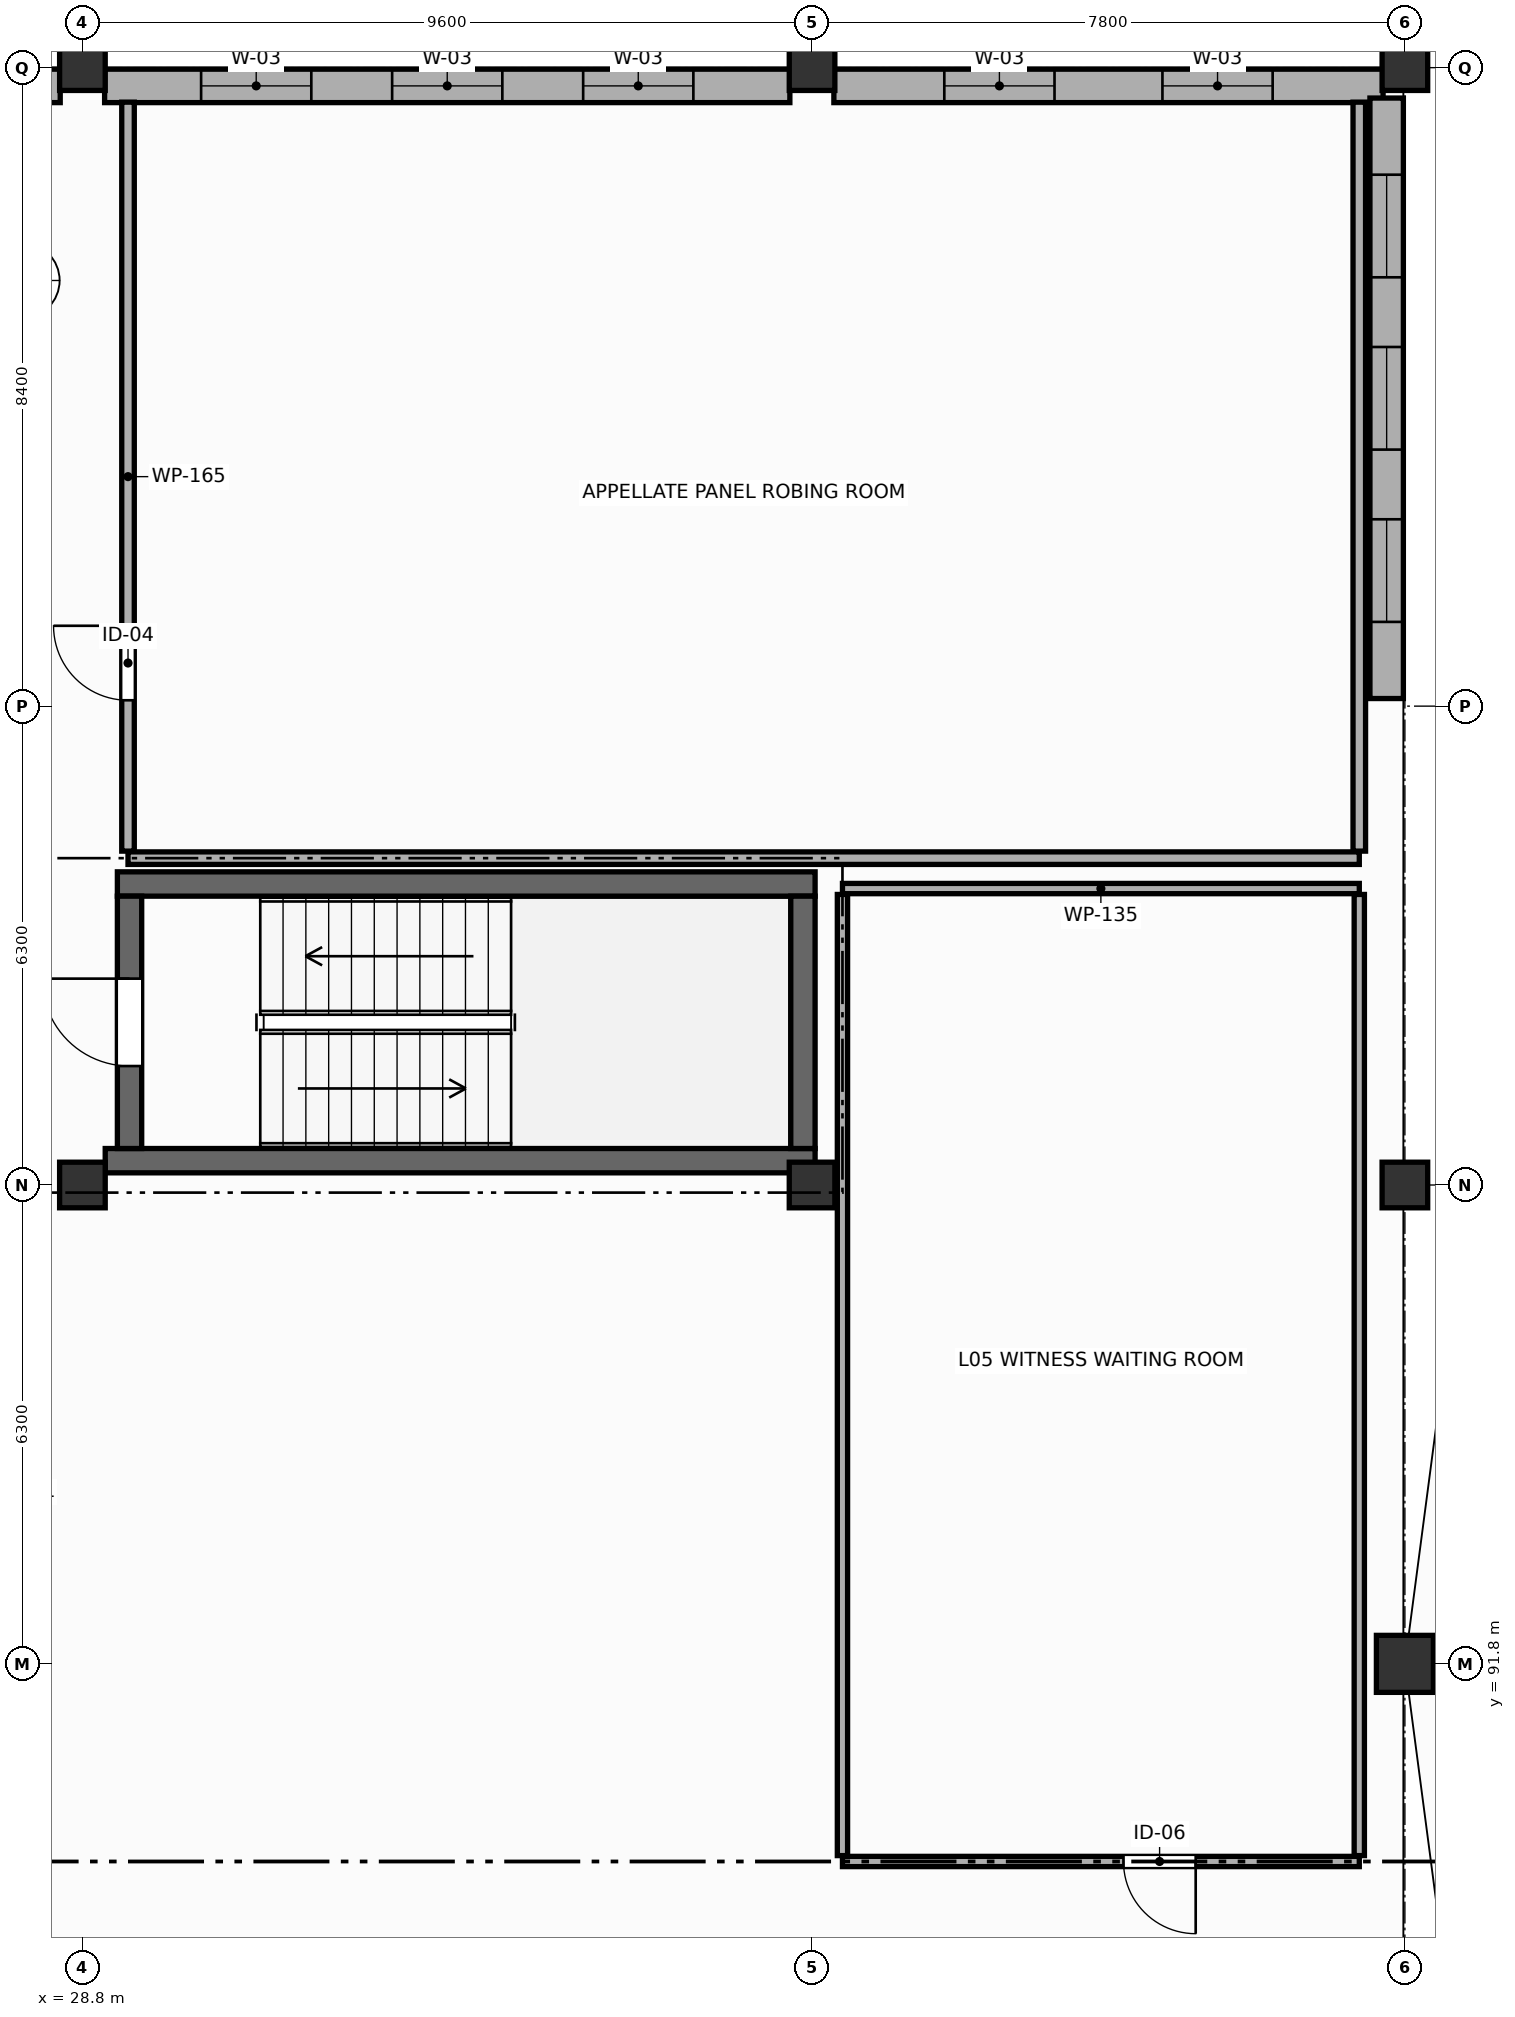
"""IFC4 building model, lengths in metres.
Left out: names, types, materials, properties, quantities, classifications, styles, units other than length and angle.
Written with IfcOpenShell. Run it as: python <this file> out.ifc"""

import sys

from ifc_helpers import new_model, si_unit, direction, frame, frame_2d, origin, origin_2d, place, context, subcontext, project, spatial, rectangle, circle, extrude, element, fill, save


model = new_model("IFC4")
c1 = context("Model", 3, precision=1e-05, world=origin(), true_north=direction((0.0, 1.0)))
c2 = subcontext(c1, "Body", "Model", "MODEL_VIEW")
j1 = project(units=[si_unit("LENGTHUNIT", "METRE"), si_unit("PLANEANGLEUNIT", "RADIAN")], contexts=[c1])
p1 = place(None, origin())
s1 = spatial("IfcSite", under=j1, at=p1, CompositionType="ELEMENT")
p2 = place(p1, origin())
s2 = spatial("IfcBuilding", under=s1, at=p2, CompositionType="ELEMENT")
p3 = place(p2, frame((0.0, 0.0, 18.6)))
s3 = spatial("IfcBuildingStorey", under=s2, at=p3, CompositionType="ELEMENT", Elevation=18.6)
p4 = place(p3, frame((46.2, 91.8, 0.0), z_axis=(0.0, 0.0, 1.0), x_axis=(1.0, 0.0, 0.0)))
e1 = element("IfcColumn", 1, at=p4, inside=s3, PredefinedType="COLUMN", context=c2, shape_type="SweptSolid", body=[
    extrude(circle(Radius=0.375, at=origin_2d()), origin(), (0.0, 0.0, 1.0), 4.2),
])
for number, where, z_axis, x_axis in (
    (2, (28.8, 98.1, 0.0), (0.0, 0.0, 1.0), (1.0, 0.0, 0.0)),
    (3, (28.8, 112.8, 0.0), (0.0, 0.0, 1.0), (1.0, 0.0, 0.0)),
    (4, (38.4, 98.1, 0.0), (0.0, 0.0, 1.0), (1.0, 0.0, 0.0)),
    (5, (38.4, 112.8, 0.0), (0.0, 0.0, 1.0), (1.0, 0.0, 0.0)),
    (6, (46.2, 98.1, 0.0), (0.0, 0.0, 1.0), (1.0, 0.0, 0.0)),
    (7, (46.2, 112.8, 0.0), (0.0, 0.0, 1.0), (1.0, 0.0, 0.0)),
):
    element("IfcColumn", number, at=place(p3, frame(where, z_axis=z_axis, x_axis=x_axis)), inside=s3, PredefinedType="COLUMN", context=c2, shape_type="SweptSolid", body=[
        extrude(rectangle(XDim=0.6, YDim=0.6, at=origin_2d()), origin(), (0.0, 0.0, 1.0), 4.2),
    ])
p5 = place(p3, frame((19.492, 112.56, 0.0), z_axis=(0.0, 0.0, 1.0), x_axis=(1.0, 0.0, 0.0)))
e8 = element("IfcWall", 8, at=p5, inside=s3, PredefinedType="STANDARD", context=c2, shape_type="SweptSolid", body=[
    extrude(rectangle(XDim=9.016, YDim=0.44, at=frame_2d((4.508, 0.0))), origin(), (0.0, 0.0, 1.0), 3.04),
])
p6 = place(p5, frame((1.27, 0.0, 0.77)))
e9 = element("IfcOpeningElement", 9, at=p6, cuts=e8, PredefinedType="OPENING", context=c2, shape_type="SweptSolid", body=[
    extrude(rectangle(XDim=1.45, YDim=2.05, at=frame_2d((0.725, 1.025))), frame((0.0, 0.23, 0.0), z_axis=(0.0, -1.0, 0.0), x_axis=(1.0, 0.0, 0.0)), (0.0, 0.0, 1.0), 0.46),
])
p7 = place(p5, frame((3.783, 0.0, 0.77)))
e10 = element("IfcOpeningElement", 10, at=p7, cuts=e8, PredefinedType="OPENING", context=c2, shape_type="SweptSolid", body=[
    extrude(rectangle(XDim=1.45, YDim=2.05, at=frame_2d((0.725, 1.025))), frame((0.0, 0.23, 0.0), z_axis=(0.0, -1.0, 0.0), x_axis=(1.0, 0.0, 0.0)), (0.0, 0.0, 1.0), 0.46),
])
p8 = place(p5, frame((6.296, 0.0, 0.77)))
e11 = element("IfcOpeningElement", 11, at=p8, cuts=e8, PredefinedType="OPENING", context=c2, shape_type="SweptSolid", body=[
    extrude(rectangle(XDim=1.45, YDim=2.05, at=frame_2d((0.725, 1.025))), frame((0.0, 0.23, 0.0), z_axis=(0.0, -1.0, 0.0), x_axis=(1.0, 0.0, 0.0)), (0.0, 0.0, 1.0), 0.46),
])
p9 = place(p3, frame((29.092, 112.56, 0.0), z_axis=(0.0, 0.0, 1.0), x_axis=(1.0, 0.0, 0.0)))
e12 = element("IfcWall", 12, at=p9, inside=s3, PredefinedType="STANDARD", context=c2, shape_type="SweptSolid", body=[
    extrude(rectangle(XDim=9.016, YDim=0.44, at=frame_2d((4.508, 0.0))), origin(), (0.0, 0.0, 1.0), 3.04),
])
p10 = place(p9, frame((1.27, 0.0, 0.77)))
e13 = element("IfcOpeningElement", 13, at=p10, cuts=e12, PredefinedType="OPENING", context=c2, shape_type="SweptSolid", body=[
    extrude(rectangle(XDim=1.45, YDim=2.05, at=frame_2d((0.725, 1.025))), frame((0.0, 0.23, 0.0), z_axis=(0.0, -1.0, 0.0), x_axis=(1.0, 0.0, 0.0)), (0.0, 0.0, 1.0), 0.46),
])
p11 = place(p9, frame((3.783, 0.0, 0.77)))
e14 = element("IfcOpeningElement", 14, at=p11, cuts=e12, PredefinedType="OPENING", context=c2, shape_type="SweptSolid", body=[
    extrude(rectangle(XDim=1.45, YDim=2.05, at=frame_2d((0.725, 1.025))), frame((0.0, 0.23, 0.0), z_axis=(0.0, -1.0, 0.0), x_axis=(1.0, 0.0, 0.0)), (0.0, 0.0, 1.0), 0.46),
])
p12 = place(p9, frame((6.296, 0.0, 0.77)))
e15 = element("IfcOpeningElement", 15, at=p12, cuts=e12, PredefinedType="OPENING", context=c2, shape_type="SweptSolid", body=[
    extrude(rectangle(XDim=1.45, YDim=2.05, at=frame_2d((0.725, 1.025))), frame((0.0, 0.23, 0.0), z_axis=(0.0, -1.0, 0.0), x_axis=(1.0, 0.0, 0.0)), (0.0, 0.0, 1.0), 0.46),
])
p13 = place(p3, frame((38.687, 112.56, 0.0), z_axis=(0.0, 0.0, 1.0), x_axis=(1.0, 0.0, 0.0)))
e16 = element("IfcWall", 16, at=p13, inside=s3, PredefinedType="STANDARD", context=c2, shape_type="SweptSolid", body=[
    extrude(rectangle(XDim=7.226, YDim=0.44, at=frame_2d((3.613, 0.0))), origin(), (0.0, 0.0, 1.0), 3.04),
])
p14 = place(p13, frame((1.453, 0.0, 0.77)))
e17 = element("IfcOpeningElement", 17, at=p14, cuts=e16, PredefinedType="OPENING", context=c2, shape_type="SweptSolid", body=[
    extrude(rectangle(XDim=1.45, YDim=2.05, at=frame_2d((0.725, 1.025))), frame((0.0, 0.23, 0.0), z_axis=(0.0, -1.0, 0.0), x_axis=(1.0, 0.0, 0.0)), (0.0, 0.0, 1.0), 0.46),
])
p15 = place(p13, frame((4.323, 0.0, 0.77)))
e18 = element("IfcOpeningElement", 18, at=p15, cuts=e16, PredefinedType="OPENING", context=c2, shape_type="SweptSolid", body=[
    extrude(rectangle(XDim=1.45, YDim=2.05, at=frame_2d((0.725, 1.025))), frame((0.0, 0.23, 0.0), z_axis=(0.0, -1.0, 0.0), x_axis=(1.0, 0.0, 0.0)), (0.0, 0.0, 1.0), 0.46),
])
p16 = place(p3, frame((45.96, 104.5, 0.0), z_axis=(0.0, 0.0, 1.0), x_axis=(0.0, 1.0, 0.0)))
e19 = element("IfcWall", 19, at=p16, inside=s3, PredefinedType="STANDARD", context=c2, shape_type="SweptSolid", body=[
    extrude(rectangle(XDim=7.9, YDim=0.44, at=frame_2d((3.95, 0.0))), origin(), (0.0, 0.0, 1.0), 3.04),
])
p17 = place(p16, frame((1.008, 0.0, 0.85)))
e20 = element("IfcOpeningElement", 20, at=p17, cuts=e19, PredefinedType="OPENING", context=c2, shape_type="SweptSolid", body=[
    extrude(rectangle(XDim=1.35, YDim=1.95, at=frame_2d((0.675, 0.975))), frame((0.0, 0.23, 0.0), z_axis=(0.0, -1.0, 0.0), x_axis=(1.0, 0.0, 0.0)), (0.0, 0.0, 1.0), 0.46),
])
p18 = place(p16, frame((3.275, 0.0, 0.85)))
e21 = element("IfcOpeningElement", 21, at=p18, cuts=e19, PredefinedType="OPENING", context=c2, shape_type="SweptSolid", body=[
    extrude(rectangle(XDim=1.35, YDim=1.95, at=frame_2d((0.675, 0.975))), frame((0.0, 0.23, 0.0), z_axis=(0.0, -1.0, 0.0), x_axis=(1.0, 0.0, 0.0)), (0.0, 0.0, 1.0), 0.46),
])
p19 = place(p16, frame((5.542, 0.0, 0.85)))
e22 = element("IfcOpeningElement", 22, at=p19, cuts=e19, PredefinedType="OPENING", context=c2, shape_type="SweptSolid", body=[
    extrude(rectangle(XDim=1.35, YDim=1.95, at=frame_2d((0.675, 0.975))), frame((0.0, 0.23, 0.0), z_axis=(0.0, -1.0, 0.0), x_axis=(1.0, 0.0, 0.0)), (0.0, 0.0, 1.0), 0.46),
])
p20 = place(p3, frame((29.26, 102.06, 0.0), z_axis=(0.0, 0.0, 1.0), x_axis=(1.0, 0.0, 0.0)))
e23 = element("IfcWall", 23, at=p20, inside=s3, PredefinedType="SHEAR", context=c2, shape_type="SweptSolid", body=[
    extrude(rectangle(XDim=9.18, YDim=0.32, at=frame_2d((4.59, 0.0))), origin(), (0.0, 0.0, 1.0), 3.96),
])
p21 = place(p3, frame((38.44, 98.42, 0.0), z_axis=(0.0, 0.0, 1.0), x_axis=(-1.0, 0.0, 0.0)))
e24 = element("IfcWall", 24, at=p21, inside=s3, PredefinedType="SHEAR", context=c2, shape_type="SweptSolid", body=[
    extrude(rectangle(XDim=9.34, YDim=0.32, at=frame_2d((4.67, 0.0))), origin(), (0.0, 0.0, 1.0), 3.96),
])
p22 = place(p3, frame((29.42, 98.58, 0.0), z_axis=(0.0, 0.0, 1.0), x_axis=(0.0, 1.0, 0.0)))
e25 = element("IfcWall", 25, at=p22, inside=s3, PredefinedType="SHEAR", context=c2, shape_type="SweptSolid", body=[
    extrude(rectangle(XDim=3.32, YDim=0.32, at=frame_2d((1.66, 0.0))), origin(), (0.0, 0.0, 1.0), 3.96),
])
p23 = place(p22, frame((1.085, 0.0, 0.0)))
e26 = element("IfcOpeningElement", 26, at=p23, cuts=e25, PredefinedType="OPENING", context=c2, shape_type="SweptSolid", body=[
    extrude(rectangle(XDim=1.15, YDim=2.2, at=frame_2d((0.575, 1.1))), frame((0.0, 0.17, 0.0), z_axis=(0.0, -1.0, 0.0), x_axis=(1.0, 0.0, 0.0)), (0.0, 0.0, 1.0), 0.34),
])
p24 = place(p3, frame((38.28, 101.9, 0.0), z_axis=(0.0, 0.0, 1.0), x_axis=(0.0, -1.0, 0.0)))
e27 = element("IfcWall", 27, at=p24, inside=s3, PredefinedType="SHEAR", context=c2, shape_type="SweptSolid", body=[
    extrude(rectangle(XDim=3.32, YDim=0.32, at=frame_2d((1.66, 0.0))), origin(), (0.0, 0.0, 1.0), 3.96),
])
p25 = place(p3, frame((45.6, 102.4, 0.0), z_axis=(0.0, 0.0, 1.0), x_axis=(-1.0, 0.0, 0.0)))
e28 = element("IfcWall", 28, at=p25, inside=s3, PredefinedType="PARTITIONING", context=c2, shape_type="SweptSolid", body=[
    extrude(rectangle(XDim=16.2, YDim=0.165, at=frame_2d((8.1, 0.0))), origin(), (0.0, 0.0, 1.0), 3.04),
])
p26 = place(p3, frame((29.4, 102.492, 0.0), z_axis=(0.0, 0.0, 1.0), x_axis=(0.0, 1.0, 0.0)))
e29 = element("IfcWall", 29, at=p26, inside=s3, PredefinedType="PARTITIONING", context=c2, shape_type="SweptSolid", body=[
    extrude(rectangle(XDim=9.854, YDim=0.165, at=frame_2d((4.927, 0.0))), origin(), (0.0, 0.0, 1.0), 3.34),
])
p27 = place(p26, frame((1.985, 0.0, 0.0)))
e30 = element("IfcOpeningElement", 30, at=p27, cuts=e29, PredefinedType="OPENING", context=c2, shape_type="SweptSolid", body=[
    extrude(rectangle(XDim=0.98, YDim=2.2, at=frame_2d((0.49, 1.1))), frame((0.0, 0.093, 0.0), z_axis=(0.0, -1.0, 0.0), x_axis=(1.0, 0.0, 0.0)), (0.0, 0.0, 1.0), 0.185),
])
p28 = place(p3, frame((45.6, 112.346, 0.0), z_axis=(0.0, 0.0, 1.0), x_axis=(0.0, -1.0, 0.0)))
e31 = element("IfcWall", 31, at=p28, inside=s3, PredefinedType="PARTITIONING", context=c2, shape_type="SweptSolid", body=[
    extrude(rectangle(XDim=9.854, YDim=0.165, at=frame_2d((4.927, 0.0))), origin(), (0.0, 0.0, 1.0), 3.34),
])
p29 = place(p3, frame((38.8, 102.0, 0.0), z_axis=(0.0, 0.0, 1.0), x_axis=(1.0, 0.0, 0.0)))
e32 = element("IfcWall", 32, at=p29, inside=s3, PredefinedType="PARTITIONING", context=c2, shape_type="SweptSolid", body=[
    extrude(rectangle(XDim=6.8, YDim=0.135, at=frame_2d((3.4, 0.0))), origin(), (0.0, 0.0, 1.0), 3.04),
])
p30 = place(p3, frame((45.6, 89.2, 0.0), z_axis=(0.0, 0.0, 1.0), x_axis=(-1.0, 0.0, 0.0)))
e33 = element("IfcWall", 33, at=p30, inside=s3, PredefinedType="PARTITIONING", context=c2, shape_type="SweptSolid", body=[
    extrude(rectangle(XDim=6.8, YDim=0.135, at=frame_2d((3.4, 0.0))), origin(), (0.0, 0.0, 1.0), 3.09),
])
p31 = place(p30, frame((2.153, 0.0, 0.0)))
e34 = element("IfcOpeningElement", 34, at=p31, cuts=e33, PredefinedType="OPENING", context=c2, shape_type="SweptSolid", body=[
    extrude(rectangle(XDim=0.95, YDim=2.15, at=frame_2d((0.475, 1.075))), frame((0.0, 0.077, 0.0), z_axis=(0.0, -1.0, 0.0), x_axis=(1.0, 0.0, 0.0)), (0.0, 0.0, 1.0), 0.155),
])
p32 = place(p3, frame((38.8, 89.278, 0.0), z_axis=(0.0, 0.0, 1.0), x_axis=(0.0, 1.0, 0.0)))
e35 = element("IfcWall", 35, at=p32, inside=s3, PredefinedType="PARTITIONING", context=c2, shape_type="SweptSolid", body=[
    extrude(rectangle(XDim=12.645, YDim=0.135, at=frame_2d((6.323, 0.0))), origin(), (0.0, 0.0, 1.0), 3.04),
])
p33 = place(p3, frame((45.6, 101.923, 0.0), z_axis=(0.0, 0.0, 1.0), x_axis=(0.0, -1.0, 0.0)))
e36 = element("IfcWall", 36, at=p33, inside=s3, PredefinedType="PARTITIONING", context=c2, shape_type="SweptSolid", body=[
    extrude(rectangle(XDim=12.645, YDim=0.135, at=frame_2d((6.323, 0.0))), origin(), (0.0, 0.0, 1.0), 3.34),
])
p34 = place(p10, origin())
e37 = element("IfcWindow", 37, at=p34, inside=s3, PartitioningType="SINGLE_PANEL", PredefinedType="WINDOW", context=c2, shape_type="SweptSolid", body=[
    extrude(rectangle(XDim=1.45, YDim=2.05, at=frame_2d((0.725, 1.025))), frame((0.0, 0.03, 0.0), z_axis=(0.0, -1.0, 0.0), x_axis=(1.0, 0.0, 0.0)), (0.0, 0.0, 1.0), 0.06),
])
fill(e13, e37)
p35 = place(p11, origin())
e38 = element("IfcWindow", 38, at=p35, inside=s3, PartitioningType="SINGLE_PANEL", PredefinedType="WINDOW", context=c2, shape_type="SweptSolid", body=[
    extrude(rectangle(XDim=1.45, YDim=2.05, at=frame_2d((0.725, 1.025))), frame((0.0, 0.03, 0.0), z_axis=(0.0, -1.0, 0.0), x_axis=(1.0, 0.0, 0.0)), (0.0, 0.0, 1.0), 0.06),
])
fill(e14, e38)
p36 = place(p12, origin())
e39 = element("IfcWindow", 39, at=p36, inside=s3, PartitioningType="SINGLE_PANEL", PredefinedType="WINDOW", context=c2, shape_type="SweptSolid", body=[
    extrude(rectangle(XDim=1.45, YDim=2.05, at=frame_2d((0.725, 1.025))), frame((0.0, 0.03, 0.0), z_axis=(0.0, -1.0, 0.0), x_axis=(1.0, 0.0, 0.0)), (0.0, 0.0, 1.0), 0.06),
])
fill(e15, e39)
p37 = place(p14, origin())
e40 = element("IfcWindow", 40, at=p37, inside=s3, PartitioningType="SINGLE_PANEL", PredefinedType="WINDOW", context=c2, shape_type="SweptSolid", body=[
    extrude(rectangle(XDim=1.45, YDim=2.05, at=frame_2d((0.725, 1.025))), frame((0.0, 0.03, 0.0), z_axis=(0.0, -1.0, 0.0), x_axis=(1.0, 0.0, 0.0)), (0.0, 0.0, 1.0), 0.06),
])
fill(e17, e40)
p38 = place(p15, origin())
e41 = element("IfcWindow", 41, at=p38, inside=s3, PartitioningType="SINGLE_PANEL", PredefinedType="WINDOW", context=c2, shape_type="SweptSolid", body=[
    extrude(rectangle(XDim=1.45, YDim=2.05, at=frame_2d((0.725, 1.025))), frame((0.0, 0.03, 0.0), z_axis=(0.0, -1.0, 0.0), x_axis=(1.0, 0.0, 0.0)), (0.0, 0.0, 1.0), 0.06),
])
fill(e18, e41)
p39 = place(p17, origin())
e42 = element("IfcWindow", 42, at=p39, inside=s3, PartitioningType="SINGLE_PANEL", PredefinedType="WINDOW", context=c2, shape_type="SweptSolid", body=[
    extrude(rectangle(XDim=1.35, YDim=1.95, at=frame_2d((0.675, 0.975))), frame((0.0, 0.03, 0.0), z_axis=(0.0, -1.0, 0.0), x_axis=(1.0, 0.0, 0.0)), (0.0, 0.0, 1.0), 0.06),
])
fill(e20, e42)
p40 = place(p18, origin())
e43 = element("IfcWindow", 43, at=p40, inside=s3, PartitioningType="SINGLE_PANEL", PredefinedType="WINDOW", context=c2, shape_type="SweptSolid", body=[
    extrude(rectangle(XDim=1.35, YDim=1.95, at=frame_2d((0.675, 0.975))), frame((0.0, 0.03, 0.0), z_axis=(0.0, -1.0, 0.0), x_axis=(1.0, 0.0, 0.0)), (0.0, 0.0, 1.0), 0.06),
])
fill(e21, e43)
p41 = place(p19, origin())
e44 = element("IfcWindow", 44, at=p41, inside=s3, PartitioningType="SINGLE_PANEL", PredefinedType="WINDOW", context=c2, shape_type="SweptSolid", body=[
    extrude(rectangle(XDim=1.35, YDim=1.95, at=frame_2d((0.675, 0.975))), frame((0.0, 0.03, 0.0), z_axis=(0.0, -1.0, 0.0), x_axis=(1.0, 0.0, 0.0)), (0.0, 0.0, 1.0), 0.06),
])
fill(e22, e44)
p42 = place(p23, origin())
e45 = element("IfcDoor", 45, at=p42, inside=s3, OperationType="SINGLE_SWING_RIGHT", PredefinedType="DOOR", context=c2, shape_type="SweptSolid", body=[
    extrude(rectangle(XDim=1.15, YDim=2.2, at=frame_2d((0.575, 1.1))), frame((0.0, 0.025, 0.0), z_axis=(0.0, -1.0, 0.0), x_axis=(1.0, 0.0, 0.0)), (0.0, 0.0, 1.0), 0.05),
])
fill(e26, e45)
p43 = place(p27, origin())
e46 = element("IfcDoor", 46, at=p43, inside=s3, OperationType="SINGLE_SWING_RIGHT", PredefinedType="DOOR", context=c2, shape_type="SweptSolid", body=[
    extrude(rectangle(XDim=0.98, YDim=2.2, at=frame_2d((0.49, 1.1))), frame((0.0, 0.025, 0.0), z_axis=(0.0, -1.0, 0.0), x_axis=(1.0, 0.0, 0.0)), (0.0, 0.0, 1.0), 0.05),
])
fill(e30, e46)
p44 = place(p31, origin())
e47 = element("IfcDoor", 47, at=p44, inside=s3, OperationType="SINGLE_SWING_LEFT", PredefinedType="DOOR", context=c2, shape_type="SweptSolid", body=[
    extrude(rectangle(XDim=0.95, YDim=2.15, at=frame_2d((0.475, 1.075))), frame((0.0, 0.025, 0.0), z_axis=(0.0, -1.0, 0.0), x_axis=(1.0, 0.0, 0.0)), (0.0, 0.0, 1.0), 0.05),
])
fill(e34, e47)
save(model, sys.argv[1])
